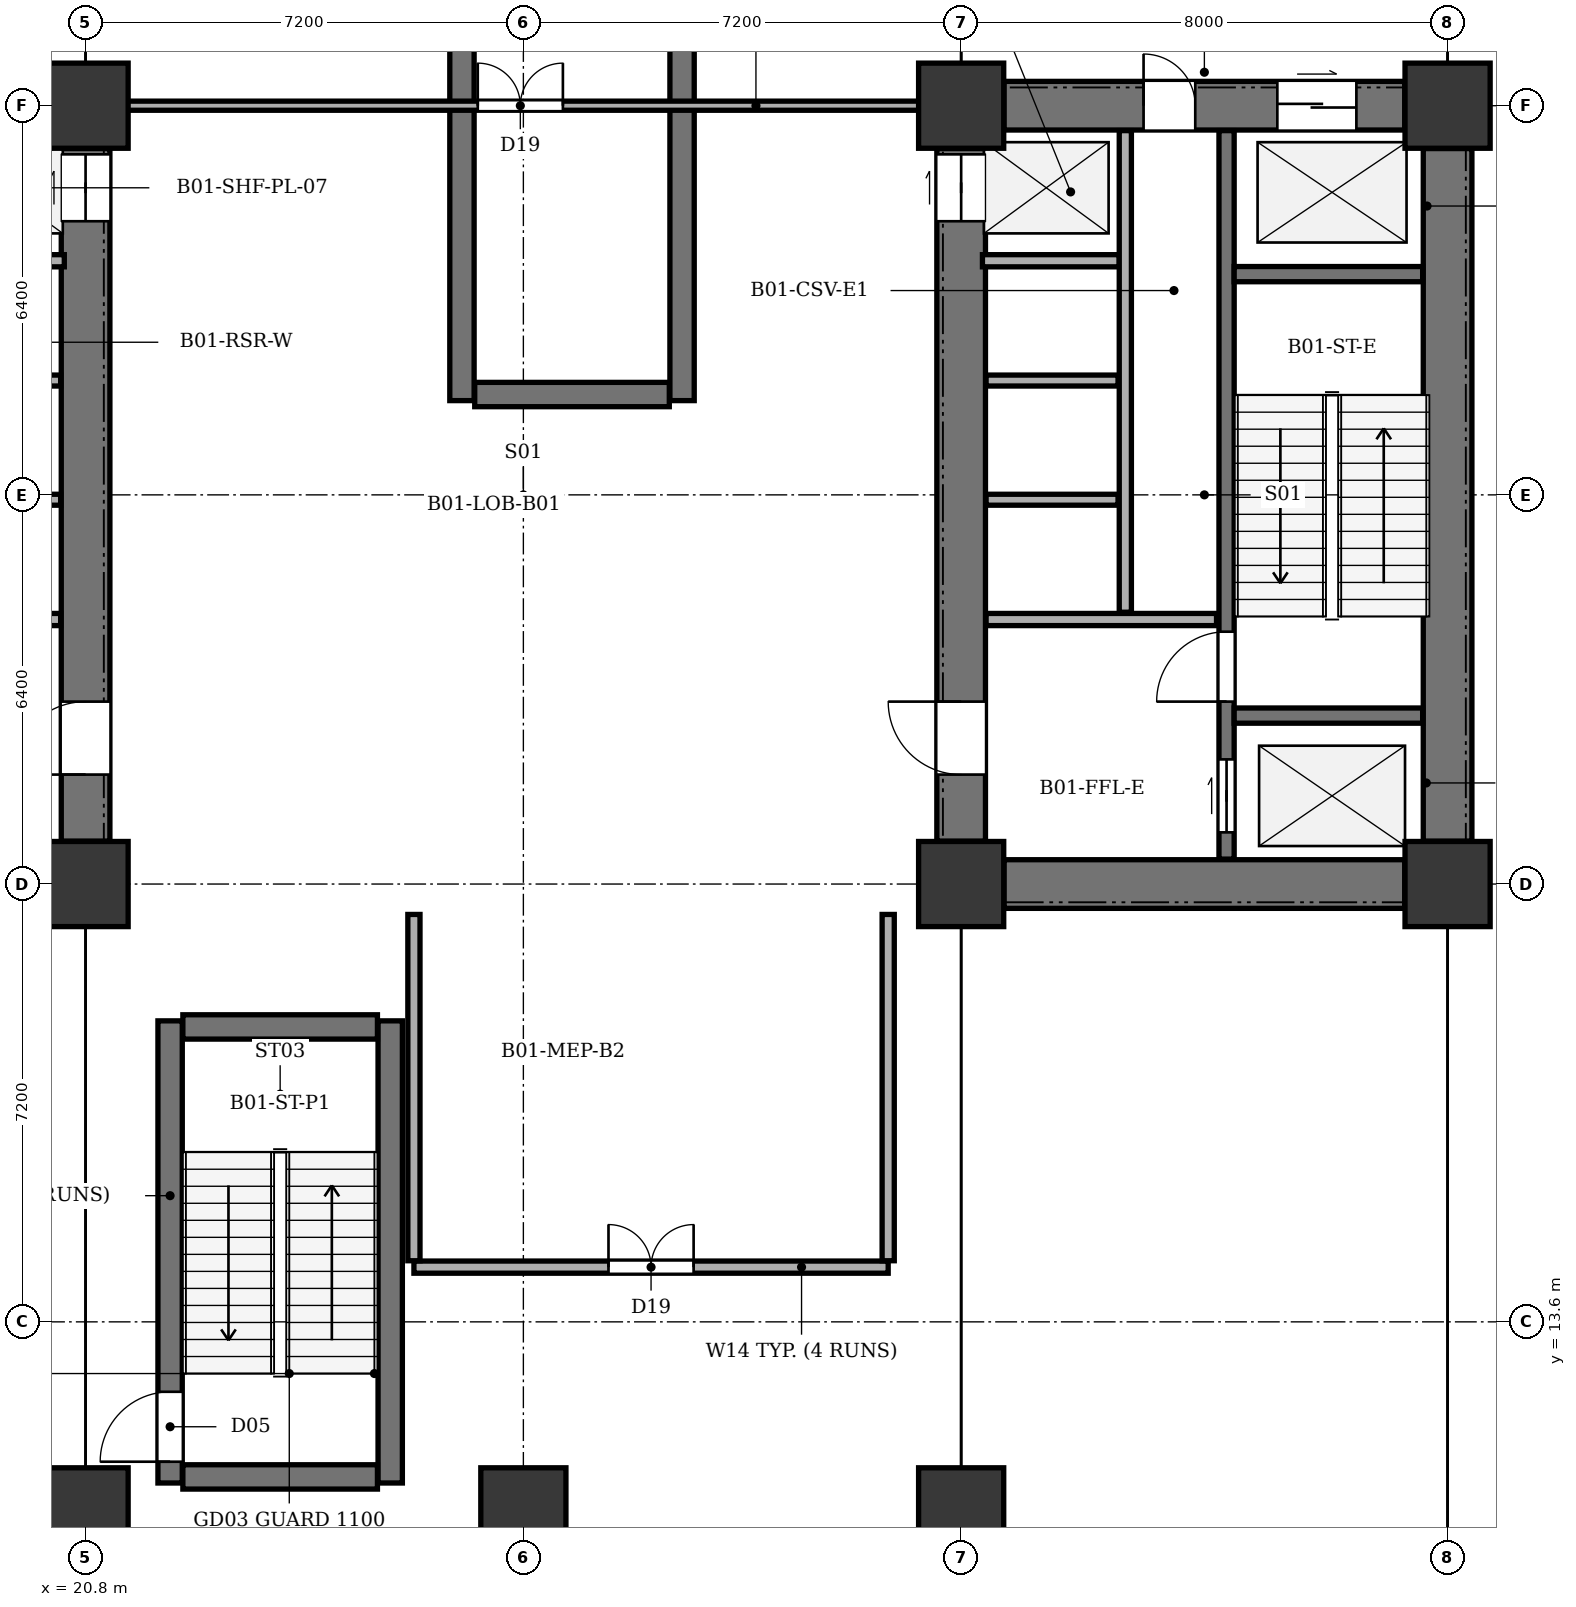
"""IFC4 building model, lengths in metres.
Left out: names, types, materials, properties, quantities, classifications, styles, units other than length and angle.
Written with IfcOpenShell. Run it as: python <this file> out.ifc"""

import sys

from ifc_helpers import new_model, si_unit, direction, frame, frame_2d, origin, origin_2d, place, context, subcontext, project, spatial, rectangle, extrude, element, fill, save


model = new_model("IFC4")
c1 = context("Model", 3, precision=1e-05, world=origin(), true_north=direction((0.0, 1.0)))
c2 = subcontext(c1, "Body", "Model", "MODEL_VIEW")
j1 = project(units=[si_unit("LENGTHUNIT", "METRE"), si_unit("PLANEANGLEUNIT", "RADIAN")], contexts=[c1])
p1 = place(None, origin())
s1 = spatial("IfcSite", under=j1, at=p1, CompositionType="ELEMENT")
p2 = place(p1, origin())
s2 = spatial("IfcBuilding", under=s1, at=p2, CompositionType="ELEMENT")
p3 = place(p2, frame((0.0, 0.0, -4.8)))
s3 = spatial("IfcBuildingStorey", under=s2, at=p3, CompositionType="ELEMENT", Elevation=-4.8)
for number, where, z_axis, x_axis in (
    (1, (20.8, 20.8, 0.0), (0.0, 0.0, 1.0), (1.0, 0.0, 0.0)),
    (2, (20.8, 33.6, 0.0), (0.0, 0.0, 1.0), (1.0, 0.0, 0.0)),
    (3, (35.2, 20.8, 0.0), (0.0, 0.0, 1.0), (1.0, 0.0, 0.0)),
    (4, (43.2, 20.8, 0.0), (0.0, 0.0, 1.0), (1.0, 0.0, 0.0)),
    (5, (35.2, 33.6, 0.0), (0.0, 0.0, 1.0), (1.0, 0.0, 0.0)),
    (6, (43.2, 33.6, 0.0), (0.0, 0.0, 1.0), (1.0, 0.0, 0.0)),
    (7, (20.8, 10.5, 0.0), (0.0, 0.0, 1.0), (1.0, 0.0, 0.0)),
    (8, (28.0, 10.5, 0.0), (0.0, 0.0, 1.0), (1.0, 0.0, 0.0)),
    (9, (35.2, 10.5, 0.0), (0.0, 0.0, 1.0), (1.0, 0.0, 0.0)),
):
    element("IfcColumn", number, at=place(p3, frame(where, z_axis=z_axis, x_axis=x_axis)), inside=s3, PredefinedType="COLUMN", context=c2, shape_type="SweptSolid", body=[
        extrude(rectangle(XDim=1.4, YDim=1.4, at=origin_2d()), origin(), (0.0, 0.0, 1.0), 4.8),
    ])
p4 = place(p3, frame((20.8, 21.505, 0.0), z_axis=(0.0, 0.0, 1.0), x_axis=(0.0, 1.0, 0.0)))
e10 = element("IfcWall", 10, at=p4, inside=s3, PredefinedType="SHEAR", context=c2, shape_type="SweptSolid", body=[
    extrude(rectangle(XDim=11.39, YDim=0.8, at=frame_2d((5.695, 0.0))), origin(), (0.0, 0.0, 1.0), 4.35),
])
p5 = place(p4, frame((1.095, 0.0, 0.0)))
e11 = element("IfcOpeningElement", 11, at=p5, cuts=e10, PredefinedType="OPENING", context=c2, shape_type="SweptSolid", body=[
    extrude(rectangle(XDim=1.2, YDim=2.15, at=frame_2d((0.6, 1.075))), frame((0.0, 0.41, 0.0), z_axis=(0.0, -1.0, 0.0), x_axis=(1.0, 0.0, 0.0)), (0.0, 0.0, 1.0), 0.82),
])
p6 = place(p4, frame((10.195, 0.0, 0.0)))
e12 = element("IfcOpeningElement", 12, at=p6, cuts=e10, PredefinedType="OPENING", context=c2, shape_type="SweptSolid", body=[
    extrude(rectangle(XDim=1.1, YDim=2.1, at=frame_2d((0.55, 1.05))), frame((0.0, 0.41, 0.0), z_axis=(0.0, -1.0, 0.0), x_axis=(1.0, 0.0, 0.0)), (0.0, 0.0, 1.0), 0.82),
])
p7 = place(p3, frame((16.6, 25.15, 0.0), z_axis=(0.0, 0.0, 1.0), x_axis=(1.0, 0.0, 0.0)))
e13 = element("IfcWall", 13, at=p7, inside=s3, PredefinedType="SOLIDWALL", context=c2, shape_type="SweptSolid", body=[
    extrude(rectangle(XDim=3.79, YDim=0.2, at=frame_2d((1.895, 0.0))), origin(), (0.0, 0.0, 1.0), 4.35),
])
p8 = place(p7, frame((0.3, 0.0, 0.0)))
e14 = element("IfcOpeningElement", 14, at=p8, cuts=e13, PredefinedType="OPENING", context=c2, shape_type="SweptSolid", body=[
    extrude(rectangle(XDim=0.85, YDim=2.02, at=frame_2d((0.425, 1.01))), frame((0.0, 0.11, 0.0), z_axis=(0.0, -1.0, 0.0), x_axis=(1.0, 0.0, 0.0)), (0.0, 0.0, 1.0), 0.22),
])
p9 = place(p3, frame((16.6, 31.05, 0.0), z_axis=(0.0, 0.0, 1.0), x_axis=(1.0, 0.0, 0.0)))
e15 = element("IfcWall", 15, at=p9, inside=s3, PredefinedType="SOLIDWALL", context=c2, shape_type="SweptSolid", body=[
    extrude(rectangle(XDim=3.85, YDim=0.2, at=frame_2d((1.925, 0.0))), origin(), (0.0, 0.0, 1.0), 4.35),
])
for number, where, z_axis, x_axis in (
    (16, (18.22, 27.12, 0.0), (0.0, 0.0, 1.0), (1.0, 0.0, 0.0)),
    (17, (18.22, 29.08, 0.0), (0.0, 0.0, 1.0), (1.0, 0.0, 0.0)),
):
    element("IfcWall", number, at=place(p3, frame(where, z_axis=z_axis, x_axis=x_axis)), inside=s3, PredefinedType="PARTITIONING", context=c2, shape_type="SweptSolid", body=[
        extrude(rectangle(XDim=2.17, YDim=0.18, at=frame_2d((1.085, 0.0))), origin(), (0.0, 0.0, 1.0), 4.35),
    ])
p10 = place(p3, frame((43.2, 21.505, 0.0), z_axis=(0.0, 0.0, 1.0), x_axis=(0.0, 1.0, 0.0)))
e18 = element("IfcWall", 18, at=p10, inside=s3, PredefinedType="SHEAR", context=c2, shape_type="SweptSolid", body=[
    extrude(rectangle(XDim=11.39, YDim=0.8, at=frame_2d((5.695, 0.0))), origin(), (0.0, 0.0, 1.0), 4.35),
])
p11 = place(p3, frame((35.905, 20.8, 0.0), z_axis=(0.0, 0.0, 1.0), x_axis=(1.0, 0.0, 0.0)))
e19 = element("IfcWall", 19, at=p11, inside=s3, PredefinedType="SHEAR", context=c2, shape_type="SweptSolid", body=[
    extrude(rectangle(XDim=6.59, YDim=0.8, at=frame_2d((3.295, 0.0))), origin(), (0.0, 0.0, 1.0), 4.35),
])
p12 = place(p3, frame((35.905, 33.6, 0.0), z_axis=(0.0, 0.0, 1.0), x_axis=(1.0, 0.0, 0.0)))
e20 = element("IfcWall", 20, at=p12, inside=s3, PredefinedType="SHEAR", context=c2, shape_type="SweptSolid", body=[
    extrude(rectangle(XDim=6.59, YDim=0.8, at=frame_2d((3.295, 0.0))), origin(), (0.0, 0.0, 1.0), 4.35),
])
p13 = place(p12, frame((4.495, 0.0, 0.0)))
e21 = element("IfcOpeningElement", 21, at=p13, cuts=e20, PredefinedType="OPENING", context=c2, shape_type="SweptSolid", body=[
    extrude(rectangle(XDim=1.3, YDim=2.15, at=frame_2d((0.65, 1.075))), frame((0.0, 0.41, 0.0), z_axis=(0.0, -1.0, 0.0), x_axis=(1.0, 0.0, 0.0)), (0.0, 0.0, 1.0), 0.82),
])
p14 = place(p12, frame((2.295, 0.0, 0.0)))
e22 = element("IfcOpeningElement", 22, at=p14, cuts=e20, PredefinedType="OPENING", context=c2, shape_type="SweptSolid", body=[
    extrude(rectangle(XDim=0.85, YDim=2.02, at=frame_2d((0.425, 1.01))), frame((0.0, 0.41, 0.0), z_axis=(0.0, -1.0, 0.0), x_axis=(1.0, 0.0, 0.0)), (0.0, 0.0, 1.0), 0.82),
])
p15 = place(p3, frame((35.2, 21.505, 0.0), z_axis=(0.0, 0.0, 1.0), x_axis=(0.0, 1.0, 0.0)))
e23 = element("IfcWall", 23, at=p15, inside=s3, PredefinedType="SHEAR", context=c2, shape_type="SweptSolid", body=[
    extrude(rectangle(XDim=11.39, YDim=0.8, at=frame_2d((5.695, 0.0))), origin(), (0.0, 0.0, 1.0), 4.35),
])
p16 = place(p15, frame((1.095, 0.0, 0.0)))
e24 = element("IfcOpeningElement", 24, at=p16, cuts=e23, PredefinedType="OPENING", context=c2, shape_type="SweptSolid", body=[
    extrude(rectangle(XDim=1.2, YDim=2.15, at=frame_2d((0.6, 1.075))), frame((0.0, 0.41, 0.0), z_axis=(0.0, -1.0, 0.0), x_axis=(1.0, 0.0, 0.0)), (0.0, 0.0, 1.0), 0.82),
])
p17 = place(p15, frame((10.195, 0.0, 0.0)))
e25 = element("IfcOpeningElement", 25, at=p17, cuts=e23, PredefinedType="OPENING", context=c2, shape_type="SweptSolid", body=[
    extrude(rectangle(XDim=1.1, YDim=2.1, at=frame_2d((0.55, 1.05))), frame((0.0, 0.41, 0.0), z_axis=(0.0, -1.0, 0.0), x_axis=(1.0, 0.0, 0.0)), (0.0, 0.0, 1.0), 0.82),
])
p18 = place(p3, frame((39.565, 21.21, 0.0), z_axis=(0.0, 0.0, 1.0), x_axis=(0.0, 1.0, 0.0)))
e26 = element("IfcWall", 26, at=p18, inside=s3, PredefinedType="SHEAR", context=c2, shape_type="SweptSolid", body=[
    extrude(rectangle(XDim=11.98, YDim=0.25, at=frame_2d((5.99, 0.0))), origin(), (0.0, 0.0, 1.0), 4.35),
])
p19 = place(p18, frame((0.44, 0.0, 0.0)))
e27 = element("IfcOpeningElement", 27, at=p19, cuts=e26, PredefinedType="OPENING", context=c2, shape_type="SweptSolid", body=[
    extrude(rectangle(XDim=1.2, YDim=2.15, at=frame_2d((0.6, 1.075))), frame((0.0, 0.135, 0.0), z_axis=(0.0, -1.0, 0.0), x_axis=(1.0, 0.0, 0.0)), (0.0, 0.0, 1.0), 0.27),
])
p20 = place(p18, frame((2.59, 0.0, 0.0)))
e28 = element("IfcOpeningElement", 28, at=p20, cuts=e26, PredefinedType="OPENING", context=c2, shape_type="SweptSolid", body=[
    extrude(rectangle(XDim=1.15, YDim=2.15, at=frame_2d((0.575, 1.075))), frame((0.0, 0.135, 0.0), z_axis=(0.0, -1.0, 0.0), x_axis=(1.0, 0.0, 0.0)), (0.0, 0.0, 1.0), 0.27),
])
for number, where, z_axis, x_axis in (
    (29, (39.69, 23.57, 0.0), (0.0, 0.0, 1.0), (1.0, 0.0, 0.0)),
    (30, (39.69, 30.83, 0.0), (0.0, 0.0, 1.0), (1.0, 0.0, 0.0)),
):
    element("IfcWall", number, at=place(p3, frame(where, z_axis=z_axis, x_axis=x_axis)), inside=s3, PredefinedType="SHEAR", context=c2, shape_type="SweptSolid", body=[
        extrude(rectangle(XDim=3.1, YDim=0.25, at=frame_2d((1.55, 0.0))), origin(), (0.0, 0.0, 1.0), 4.35),
    ])
p21 = place(p3, frame((35.61, 25.15, 0.0), z_axis=(0.0, 0.0, 1.0), x_axis=(1.0, 0.0, 0.0)))
e31 = element("IfcWall", 31, at=p21, inside=s3, PredefinedType="SOLIDWALL", context=c2, shape_type="SweptSolid", body=[
    extrude(rectangle(XDim=3.79, YDim=0.2, at=frame_2d((1.895, 0.0))), origin(), (0.0, 0.0, 1.0), 4.35),
])
p22 = place(p3, frame((35.55, 31.05, 0.0), z_axis=(0.0, 0.0, 1.0), x_axis=(1.0, 0.0, 0.0)))
e32 = element("IfcWall", 32, at=p22, inside=s3, PredefinedType="SOLIDWALL", context=c2, shape_type="SweptSolid", body=[
    extrude(rectangle(XDim=2.25, YDim=0.2, at=frame_2d((1.125, 0.0))), origin(), (0.0, 0.0, 1.0), 4.35),
])
p23 = place(p3, frame((37.9, 25.27, 0.0), z_axis=(0.0, 0.0, 1.0), x_axis=(0.0, 1.0, 0.0)))
e33 = element("IfcWall", 33, at=p23, inside=s3, PredefinedType="SOLIDWALL", context=c2, shape_type="SweptSolid", body=[
    extrude(rectangle(XDim=7.92, YDim=0.2, at=frame_2d((3.96, 0.0))), origin(), (0.0, 0.0, 1.0), 4.35),
])
for number, where, z_axis, x_axis in (
    (34, (35.61, 27.12, 0.0), (0.0, 0.0, 1.0), (1.0, 0.0, 0.0)),
    (35, (35.61, 29.08, 0.0), (0.0, 0.0, 1.0), (1.0, 0.0, 0.0)),
):
    element("IfcWall", number, at=place(p3, frame(where, z_axis=z_axis, x_axis=x_axis)), inside=s3, PredefinedType="PARTITIONING", context=c2, shape_type="SweptSolid", body=[
        extrude(rectangle(XDim=2.17, YDim=0.18, at=frame_2d((1.085, 0.0))), origin(), (0.0, 0.0, 1.0), 4.35),
    ])
p24 = place(p3, frame((22.19, 10.95, 0.0), z_axis=(0.0, 0.0, 1.0), x_axis=(0.0, 1.0, 0.0)))
e36 = element("IfcWall", 36, at=p24, inside=s3, PredefinedType="SHEAR", context=c2, shape_type="SweptSolid", body=[
    extrude(rectangle(XDim=7.6, YDim=0.4, at=frame_2d((3.8, 0.0))), origin(), (0.0, 0.0, 1.0), 4.35),
])
p25 = place(p24, frame((0.35, 0.0, 0.0)))
e37 = element("IfcOpeningElement", 37, at=p25, cuts=e36, PredefinedType="OPENING", context=c2, shape_type="SweptSolid", body=[
    extrude(rectangle(XDim=1.15, YDim=2.15, at=frame_2d((0.575, 1.075))), frame((0.0, 0.21, 0.0), z_axis=(0.0, -1.0, 0.0), x_axis=(1.0, 0.0, 0.0)), (0.0, 0.0, 1.0), 0.42),
])
p26 = place(p3, frame((25.81, 10.95, 0.0), z_axis=(0.0, 0.0, 1.0), x_axis=(0.0, 1.0, 0.0)))
e38 = element("IfcWall", 38, at=p26, inside=s3, PredefinedType="SHEAR", context=c2, shape_type="SweptSolid", body=[
    extrude(rectangle(XDim=7.6, YDim=0.4, at=frame_2d((3.8, 0.0))), origin(), (0.0, 0.0, 1.0), 4.35),
])
for number, where, z_axis, x_axis in (
    (39, (22.4, 11.05, 0.0), (0.0, 0.0, 1.0), (1.0, 0.0, 0.0)),
    (40, (22.4, 18.45, 0.0), (0.0, 0.0, 1.0), (1.0, 0.0, 0.0)),
):
    element("IfcWall", number, at=place(p3, frame(where, z_axis=z_axis, x_axis=x_axis)), inside=s3, PredefinedType="SHEAR", context=c2, shape_type="SweptSolid", body=[
        extrude(rectangle(XDim=3.2, YDim=0.4, at=frame_2d((1.6, 0.0))), origin(), (0.0, 0.0, 1.0), 4.35),
    ])
for number, where, z_axis, x_axis in (
    (41, (26.99, 28.75, 0.0), (0.0, 0.0, 1.0), (0.0, 1.0, 0.0)),
    (42, (30.61, 28.75, 0.0), (0.0, 0.0, 1.0), (0.0, 1.0, 0.0)),
):
    element("IfcWall", number, at=place(p3, frame(where, z_axis=z_axis, x_axis=x_axis)), inside=s3, PredefinedType="SHEAR", context=c2, shape_type="SweptSolid", body=[
        extrude(rectangle(XDim=7.6, YDim=0.4, at=frame_2d((3.8, 0.0))), origin(), (0.0, 0.0, 1.0), 4.35),
    ])
p27 = place(p3, frame((27.2, 28.85, 0.0), z_axis=(0.0, 0.0, 1.0), x_axis=(1.0, 0.0, 0.0)))
e43 = element("IfcWall", 43, at=p27, inside=s3, PredefinedType="SHEAR", context=c2, shape_type="SweptSolid", body=[
    extrude(rectangle(XDim=3.2, YDim=0.4, at=frame_2d((1.6, 0.0))), origin(), (0.0, 0.0, 1.0), 4.35),
])
p28 = place(p3, frame((26.2, 14.5, 0.0), z_axis=(0.0, 0.0, 1.0), x_axis=(1.0, 0.0, 0.0)))
e44 = element("IfcWall", 44, at=p28, inside=s3, PredefinedType="SOLIDWALL", context=c2, shape_type="SweptSolid", body=[
    extrude(rectangle(XDim=7.8, YDim=0.2, at=frame_2d((3.9, 0.0))), origin(), (0.0, 0.0, 1.0), 4.35),
])
p29 = place(p28, frame((3.2, 0.0, 0.0)))
e45 = element("IfcOpeningElement", 45, at=p29, cuts=e44, PredefinedType="OPENING", context=c2, shape_type="SweptSolid", body=[
    extrude(rectangle(XDim=1.4, YDim=2.15, at=frame_2d((0.7, 1.075))), frame((0.0, 0.11, 0.0), z_axis=(0.0, -1.0, 0.0), x_axis=(1.0, 0.0, 0.0)), (0.0, 0.0, 1.0), 0.22),
])
p30 = place(p3, frame((26.2, 14.605, 0.0), z_axis=(0.0, 0.0, 1.0), x_axis=(0.0, 1.0, 0.0)))
e46 = element("IfcWall", 46, at=p30, inside=s3, PredefinedType="SOLIDWALL", context=c2, shape_type="SweptSolid", body=[
    extrude(rectangle(XDim=5.695, YDim=0.2, at=frame_2d((2.848, 0.0))), origin(), (0.0, 0.0, 1.0), 3.835),
])
p31 = place(p3, frame((34.0, 14.605, 0.0), z_axis=(0.0, 0.0, 1.0), x_axis=(0.0, 1.0, 0.0)))
e47 = element("IfcWall", 47, at=p31, inside=s3, PredefinedType="SOLIDWALL", context=c2, shape_type="SweptSolid", body=[
    extrude(rectangle(XDim=5.695, YDim=0.2, at=frame_2d((2.848, 0.0))), origin(), (0.0, 0.0, 1.0), 4.35),
])
p32 = place(p3, frame((21.35, 33.6, 0.0), z_axis=(0.0, 0.0, 1.0), x_axis=(1.0, 0.0, 0.0)))
e48 = element("IfcWall", 48, at=p32, inside=s3, PredefinedType="PARTITIONING", context=c2, shape_type="SweptSolid", body=[
    extrude(rectangle(XDim=13.3, YDim=0.15, at=frame_2d((6.65, 0.0))), origin(), (0.0, 0.0, 1.0), 3.385),
])
p33 = place(p32, frame((5.9, 0.0, 0.0)))
e49 = element("IfcOpeningElement", 49, at=p33, cuts=e48, PredefinedType="OPENING", context=c2, shape_type="SweptSolid", body=[
    extrude(rectangle(XDim=1.4, YDim=2.15, at=frame_2d((0.7, 1.075))), frame((0.0, 0.085, 0.0), z_axis=(0.0, -1.0, 0.0), x_axis=(1.0, 0.0, 0.0)), (0.0, 0.0, 1.0), 0.17),
])
p34 = place(p5, origin())
e50 = element("IfcDoor", 50, at=p34, inside=s3, OperationType="SINGLE_SWING_LEFT", PredefinedType="DOOR", context=c2, shape_type="SweptSolid", body=[
    extrude(rectangle(XDim=1.2, YDim=2.15, at=frame_2d((0.6, 1.075))), frame((0.0, 0.025, 0.0), z_axis=(0.0, -1.0, 0.0), x_axis=(1.0, 0.0, 0.0)), (0.0, 0.0, 1.0), 0.05),
])
fill(e11, e50)
p35 = place(p6, origin())
e51 = element("IfcDoor", 51, at=p35, inside=s3, OperationType="DOUBLE_DOOR_SLIDING", PredefinedType="DOOR", context=c2, shape_type="SweptSolid", body=[
    extrude(rectangle(XDim=1.1, YDim=2.1, at=frame_2d((0.55, 1.05))), frame((0.0, 0.025, 0.0), z_axis=(0.0, -1.0, 0.0), x_axis=(1.0, 0.0, 0.0)), (0.0, 0.0, 1.0), 0.05),
])
fill(e12, e51)
p36 = place(p13, origin())
e52 = element("IfcDoor", 52, at=p36, inside=s3, OperationType="DOUBLE_DOOR_SLIDING", PredefinedType="DOOR", context=c2, shape_type="SweptSolid", body=[
    extrude(rectangle(XDim=1.3, YDim=2.15, at=frame_2d((0.65, 1.075))), frame((0.0, 0.025, 0.0), z_axis=(0.0, -1.0, 0.0), x_axis=(1.0, 0.0, 0.0)), (0.0, 0.0, 1.0), 0.05),
])
fill(e21, e52)
p37 = place(p14, origin())
e53 = element("IfcDoor", 53, at=p37, inside=s3, OperationType="SINGLE_SWING_LEFT", PredefinedType="DOOR", context=c2, shape_type="SweptSolid", body=[
    extrude(rectangle(XDim=0.85, YDim=2.02, at=frame_2d((0.425, 1.01))), frame((0.0, 0.025, 0.0), z_axis=(0.0, -1.0, 0.0), x_axis=(1.0, 0.0, 0.0)), (0.0, 0.0, 1.0), 0.05),
])
fill(e22, e53)
p38 = place(p16, origin())
e54 = element("IfcDoor", 54, at=p38, inside=s3, OperationType="SINGLE_SWING_RIGHT", PredefinedType="DOOR", context=c2, shape_type="SweptSolid", body=[
    extrude(rectangle(XDim=1.2, YDim=2.15, at=frame_2d((0.6, 1.075))), frame((0.0, 0.025, 0.0), z_axis=(0.0, -1.0, 0.0), x_axis=(1.0, 0.0, 0.0)), (0.0, 0.0, 1.0), 0.05),
])
fill(e24, e54)
p39 = place(p17, origin())
e55 = element("IfcDoor", 55, at=p39, inside=s3, OperationType="DOUBLE_DOOR_SLIDING", PredefinedType="DOOR", context=c2, shape_type="SweptSolid", body=[
    extrude(rectangle(XDim=1.1, YDim=2.1, at=frame_2d((0.55, 1.05))), frame((0.0, 0.025, 0.0), z_axis=(0.0, -1.0, 0.0), x_axis=(1.0, 0.0, 0.0)), (0.0, 0.0, 1.0), 0.05),
])
fill(e25, e55)
p40 = place(p19, origin())
e56 = element("IfcDoor", 56, at=p40, inside=s3, OperationType="DOUBLE_DOOR_SLIDING", PredefinedType="DOOR", context=c2, shape_type="SweptSolid", body=[
    extrude(rectangle(XDim=1.2, YDim=2.15, at=frame_2d((0.6, 1.075))), frame((0.0, 0.025, 0.0), z_axis=(0.0, -1.0, 0.0), x_axis=(1.0, 0.0, 0.0)), (0.0, 0.0, 1.0), 0.05),
])
fill(e27, e56)
p41 = place(p20, origin())
e57 = element("IfcDoor", 57, at=p41, inside=s3, OperationType="SINGLE_SWING_LEFT", PredefinedType="DOOR", context=c2, shape_type="SweptSolid", body=[
    extrude(rectangle(XDim=1.15, YDim=2.15, at=frame_2d((0.575, 1.075))), frame((0.0, 0.025, 0.0), z_axis=(0.0, -1.0, 0.0), x_axis=(1.0, 0.0, 0.0)), (0.0, 0.0, 1.0), 0.05),
])
fill(e28, e57)
p42 = place(p25, origin())
e58 = element("IfcDoor", 58, at=p42, inside=s3, OperationType="SINGLE_SWING_LEFT", PredefinedType="DOOR", context=c2, shape_type="SweptSolid", body=[
    extrude(rectangle(XDim=1.15, YDim=2.15, at=frame_2d((0.575, 1.075))), frame((0.0, 0.025, 0.0), z_axis=(0.0, -1.0, 0.0), x_axis=(1.0, 0.0, 0.0)), (0.0, 0.0, 1.0), 0.05),
])
fill(e37, e58)
p43 = place(p29, origin())
e59 = element("IfcDoor", 59, at=p43, inside=s3, OperationType="DOUBLE_DOOR_SINGLE_SWING", PredefinedType="DOOR", context=c2, shape_type="SweptSolid", body=[
    extrude(rectangle(XDim=1.4, YDim=2.15, at=frame_2d((0.7, 1.075))), frame((0.0, 0.025, 0.0), z_axis=(0.0, -1.0, 0.0), x_axis=(1.0, 0.0, 0.0)), (0.0, 0.0, 1.0), 0.05),
])
fill(e45, e59)
p44 = place(p33, origin())
e60 = element("IfcDoor", 60, at=p44, inside=s3, OperationType="DOUBLE_DOOR_SINGLE_SWING", PredefinedType="DOOR", context=c2, shape_type="SweptSolid", body=[
    extrude(rectangle(XDim=1.4, YDim=2.15, at=frame_2d((0.7, 1.075))), frame((0.0, 0.025, 0.0), z_axis=(0.0, -1.0, 0.0), x_axis=(1.0, 0.0, 0.0)), (0.0, 0.0, 1.0), 0.05),
])
fill(e49, e60)
save(model, sys.argv[1])
